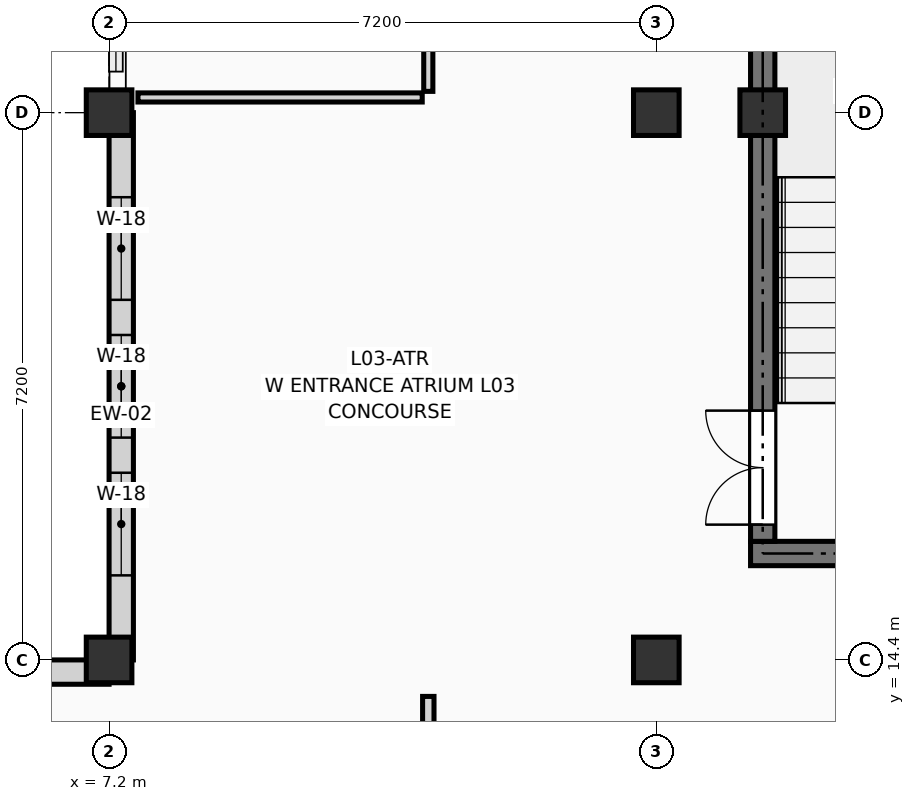
"""IFC4 building model, lengths in metres.
Left out: names, types, materials, properties, quantities, classifications, styles, units other than length and angle.
Written with IfcOpenShell. Run it as: python <this file> out.ifc"""

import sys

from ifc_helpers import new_model, si_unit, direction, frame, frame_2d, origin, origin_2d, place, context, subcontext, project, spatial, rectangle, extrude, element, fill, save


model = new_model("IFC4")
c1 = context("Model", 3, precision=1e-05, world=origin(), true_north=direction((0.0, 1.0)))
c2 = subcontext(c1, "Body", "Model", "MODEL_VIEW")
j1 = project(units=[si_unit("LENGTHUNIT", "METRE"), si_unit("PLANEANGLEUNIT", "RADIAN")], contexts=[c1])
p1 = place(None, origin())
s1 = spatial("IfcSite", under=j1, at=p1, CompositionType="ELEMENT")
p2 = place(p1, origin())
s2 = spatial("IfcBuilding", under=s1, at=p2, CompositionType="ELEMENT")
p3 = place(p2, frame((0.0, 0.0, 12.15)))
s3 = spatial("IfcBuildingStorey", under=s2, at=p3, CompositionType="ELEMENT", Elevation=12.15)
for number, where, z_axis, x_axis in (
    (1, (7.2, 14.4, 0.0), (0.0, 0.0, 1.0), (1.0, 0.0, 0.0)),
    (2, (7.2, 21.6, 0.0), (0.0, 0.0, 1.0), (1.0, 0.0, 0.0)),
    (3, (14.4, 14.4, 0.0), (0.0, 0.0, 1.0), (1.0, 0.0, 0.0)),
    (4, (14.4, 21.6, 0.0), (0.0, 0.0, 1.0), (1.0, 0.0, 0.0)),
    (5, (15.8, 21.6, 0.0), (0.0, 0.0, 1.0), (1.0, 0.0, 0.0)),
):
    element("IfcColumn", number, at=place(p3, frame(where, z_axis=z_axis, x_axis=x_axis)), inside=s3, PredefinedType="COLUMN", context=c2, shape_type="SweptSolid", body=[
        extrude(rectangle(XDim=0.6, YDim=0.6, at=origin_2d()), origin(), (0.0, 0.0, 1.0), 3.6),
    ])
p4 = place(p3, frame((7.36, 14.4, 0.0), z_axis=(0.0, 0.0, 1.0), x_axis=(0.0, 1.0, 0.0)))
e6 = element("IfcWall", 6, at=p4, inside=s3, PredefinedType="SOLIDWALL", context=c2, shape_type="SweptSolid", body=[
    extrude(rectangle(XDim=7.2, YDim=0.32, at=frame_2d((3.6, 0.0))), origin(), (0.0, 0.0, 1.0), 2.84),
])
p5 = place(p4, frame((1.113, 0.0, 0.18)))
e7 = element("IfcOpeningElement", 7, at=p5, cuts=e6, PredefinedType="OPENING", context=c2, shape_type="SweptSolid", body=[
    extrude(rectangle(XDim=1.35, YDim=2.45, at=frame_2d((0.675, 1.225))), frame((0.0, 0.172, 0.0), z_axis=(0.0, -1.0, 0.0), x_axis=(1.0, 0.0, 0.0)), (0.0, 0.0, 1.0), 0.344),
])
p6 = place(p4, frame((2.925, 0.0, 0.18)))
e8 = element("IfcOpeningElement", 8, at=p6, cuts=e6, PredefinedType="OPENING", context=c2, shape_type="SweptSolid", body=[
    extrude(rectangle(XDim=1.35, YDim=2.45, at=frame_2d((0.675, 1.225))), frame((0.0, 0.172, 0.0), z_axis=(0.0, -1.0, 0.0), x_axis=(1.0, 0.0, 0.0)), (0.0, 0.0, 1.0), 0.344),
])
p7 = place(p4, frame((4.738, 0.0, 0.18)))
e9 = element("IfcOpeningElement", 9, at=p7, cuts=e6, PredefinedType="OPENING", context=c2, shape_type="SweptSolid", body=[
    extrude(rectangle(XDim=1.35, YDim=2.45, at=frame_2d((0.675, 1.225))), frame((0.0, 0.172, 0.0), z_axis=(0.0, -1.0, 0.0), x_axis=(1.0, 0.0, 0.0)), (0.0, 0.0, 1.0), 0.344),
])
p8 = place(p3, frame((0.0, 14.24, 0.0), z_axis=(0.0, 0.0, 1.0), x_axis=(1.0, 0.0, 0.0)))
e10 = element("IfcWall", 10, at=p8, inside=s3, PredefinedType="SOLIDWALL", context=c2, shape_type="SweptSolid", body=[
    extrude(rectangle(XDim=7.2, YDim=0.32, at=frame_2d((3.6, 0.0))), origin(), (0.0, 0.0, 1.0), 2.84),
])
p9 = place(p8, frame((1.113, 0.0, 0.18)))
e11 = element("IfcOpeningElement", 11, at=p9, cuts=e10, PredefinedType="OPENING", context=c2, shape_type="SweptSolid", body=[
    extrude(rectangle(XDim=1.35, YDim=2.45, at=frame_2d((0.675, 1.225))), frame((0.0, 0.172, 0.0), z_axis=(0.0, -1.0, 0.0), x_axis=(1.0, 0.0, 0.0)), (0.0, 0.0, 1.0), 0.344),
])
p10 = place(p8, frame((2.925, 0.0, 0.18)))
e12 = element("IfcOpeningElement", 12, at=p10, cuts=e10, PredefinedType="OPENING", context=c2, shape_type="SweptSolid", body=[
    extrude(rectangle(XDim=1.35, YDim=2.45, at=frame_2d((0.675, 1.225))), frame((0.0, 0.172, 0.0), z_axis=(0.0, -1.0, 0.0), x_axis=(1.0, 0.0, 0.0)), (0.0, 0.0, 1.0), 0.344),
])
p11 = place(p8, frame((4.738, 0.0, 0.18)))
e13 = element("IfcOpeningElement", 13, at=p11, cuts=e10, PredefinedType="OPENING", context=c2, shape_type="SweptSolid", body=[
    extrude(rectangle(XDim=1.35, YDim=2.45, at=frame_2d((0.675, 1.225))), frame((0.0, 0.172, 0.0), z_axis=(0.0, -1.0, 0.0), x_axis=(1.0, 0.0, 0.0)), (0.0, 0.0, 1.0), 0.344),
])
p12 = place(p3, frame((15.64, 15.8, 0.0), z_axis=(0.0, 0.0, 1.0), x_axis=(1.0, 0.0, 0.0)))
e14 = element("IfcWall", 14, at=p12, inside=s3, PredefinedType="SHEAR", context=c2, shape_type="SweptSolid", body=[
    extrude(rectangle(XDim=4.84, YDim=0.32, at=frame_2d((2.42, 0.0))), origin(), (0.0, 0.0, 1.0), 3.39),
])
p13 = place(p3, frame((15.8, 15.96, 0.0), z_axis=(0.0, 0.0, 1.0), x_axis=(0.0, 1.0, 0.0)))
e15 = element("IfcWall", 15, at=p13, inside=s3, PredefinedType="SHEAR", context=c2, shape_type="SweptSolid", body=[
    extrude(rectangle(XDim=7.68, YDim=0.32, at=frame_2d((3.84, 0.0))), origin(), (0.0, 0.0, 1.0), 3.39),
])
p14 = place(p13, frame((0.22, 0.0, 0.0)))
e16 = element("IfcOpeningElement", 16, at=p14, cuts=e15, PredefinedType="OPENING", context=c2, shape_type="SweptSolid", body=[
    extrude(rectangle(XDim=1.5, YDim=2.2, at=frame_2d((0.75, 1.1))), frame((0.0, 0.172, 0.0), z_axis=(0.0, -1.0, 0.0), x_axis=(1.0, 0.0, 0.0)), (0.0, 0.0, 1.0), 0.344),
])
p15 = place(p3, frame((11.4, 0.48, 0.0), z_axis=(0.0, 0.0, 1.0), x_axis=(0.0, 1.0, 0.0)))
e17 = element("IfcWall", 17, at=p15, inside=s3, PredefinedType="PARTITIONING", context=c2, shape_type="SweptSolid", body=[
    extrude(rectangle(XDim=13.44, YDim=0.15, at=frame_2d((6.72, 0.0))), origin(), (0.0, 0.0, 1.0), 3.375),
])
p16 = place(p15, frame((6.71, 0.0, 0.0)))
e18 = element("IfcOpeningElement", 18, at=p16, cuts=e17, PredefinedType="OPENING", context=c2, shape_type="SweptSolid", body=[
    extrude(rectangle(XDim=1.42, YDim=2.22, at=frame_2d((0.71, 1.11))), frame((0.0, 0.087, 0.0), z_axis=(0.0, -1.0, 0.0), x_axis=(1.0, 0.0, 0.0)), (0.0, 0.0, 1.0), 0.174),
])
p17 = place(p3, frame((7.58, 21.8, 0.0), z_axis=(0.0, 0.0, 1.0), x_axis=(1.0, 0.0, 0.0)))
e19 = element("IfcWall", 19, at=p17, inside=s3, PredefinedType="PARTITIONING", context=c2, shape_type="SweptSolid", body=[
    extrude(rectangle(XDim=3.74, YDim=0.12, at=frame_2d((1.87, 0.0))), origin(), (0.0, 0.0, 1.0), 2.691),
])
p18 = place(p3, frame((11.4, 21.88, 0.0), z_axis=(0.0, 0.0, 1.0), x_axis=(0.0, 1.0, 0.0)))
e20 = element("IfcWall", 20, at=p18, inside=s3, PredefinedType="PARTITIONING", context=c2, shape_type="SweptSolid", body=[
    extrude(rectangle(XDim=16.84, YDim=0.12, at=frame_2d((8.42, 0.0))), origin(), (0.0, 0.0, 1.0), 3.375),
])
p19 = place(p18, frame((7.79, 0.0, 0.0)))
e21 = element("IfcOpeningElement", 21, at=p19, cuts=e20, PredefinedType="OPENING", context=c2, shape_type="SweptSolid", body=[
    extrude(rectangle(XDim=1.26, YDim=2.18, at=frame_2d((0.63, 1.09))), frame((0.0, 0.072, 0.0), z_axis=(0.0, -1.0, 0.0), x_axis=(1.0, 0.0, 0.0)), (0.0, 0.0, 1.0), 0.144),
])
p20 = place(p5, origin())
e22 = element("IfcWindow", 22, at=p20, inside=s3, PartitioningType="SINGLE_PANEL", PredefinedType="WINDOW", context=c2, shape_type="SweptSolid", body=[
    extrude(rectangle(XDim=1.35, YDim=2.45, at=frame_2d((0.675, 1.225))), frame((0.0, 0.03, 0.0), z_axis=(0.0, -1.0, 0.0), x_axis=(1.0, 0.0, 0.0)), (0.0, 0.0, 1.0), 0.06),
])
fill(e7, e22)
p21 = place(p6, origin())
e23 = element("IfcWindow", 23, at=p21, inside=s3, PartitioningType="SINGLE_PANEL", PredefinedType="WINDOW", context=c2, shape_type="SweptSolid", body=[
    extrude(rectangle(XDim=1.35, YDim=2.45, at=frame_2d((0.675, 1.225))), frame((0.0, 0.03, 0.0), z_axis=(0.0, -1.0, 0.0), x_axis=(1.0, 0.0, 0.0)), (0.0, 0.0, 1.0), 0.06),
])
fill(e8, e23)
p22 = place(p7, origin())
e24 = element("IfcWindow", 24, at=p22, inside=s3, PartitioningType="SINGLE_PANEL", PredefinedType="WINDOW", context=c2, shape_type="SweptSolid", body=[
    extrude(rectangle(XDim=1.35, YDim=2.45, at=frame_2d((0.675, 1.225))), frame((0.0, 0.03, 0.0), z_axis=(0.0, -1.0, 0.0), x_axis=(1.0, 0.0, 0.0)), (0.0, 0.0, 1.0), 0.06),
])
fill(e9, e24)
p23 = place(p14, origin())
e25 = element("IfcDoor", 25, at=p23, inside=s3, OperationType="DOUBLE_DOOR_SINGLE_SWING", PredefinedType="DOOR", context=c2, shape_type="SweptSolid", body=[
    extrude(rectangle(XDim=1.5, YDim=2.2, at=frame_2d((0.75, 1.1))), frame((0.0, 0.025, 0.0), z_axis=(0.0, -1.0, 0.0), x_axis=(1.0, 0.0, 0.0)), (0.0, 0.0, 1.0), 0.05),
])
fill(e16, e25)
save(model, sys.argv[1])
